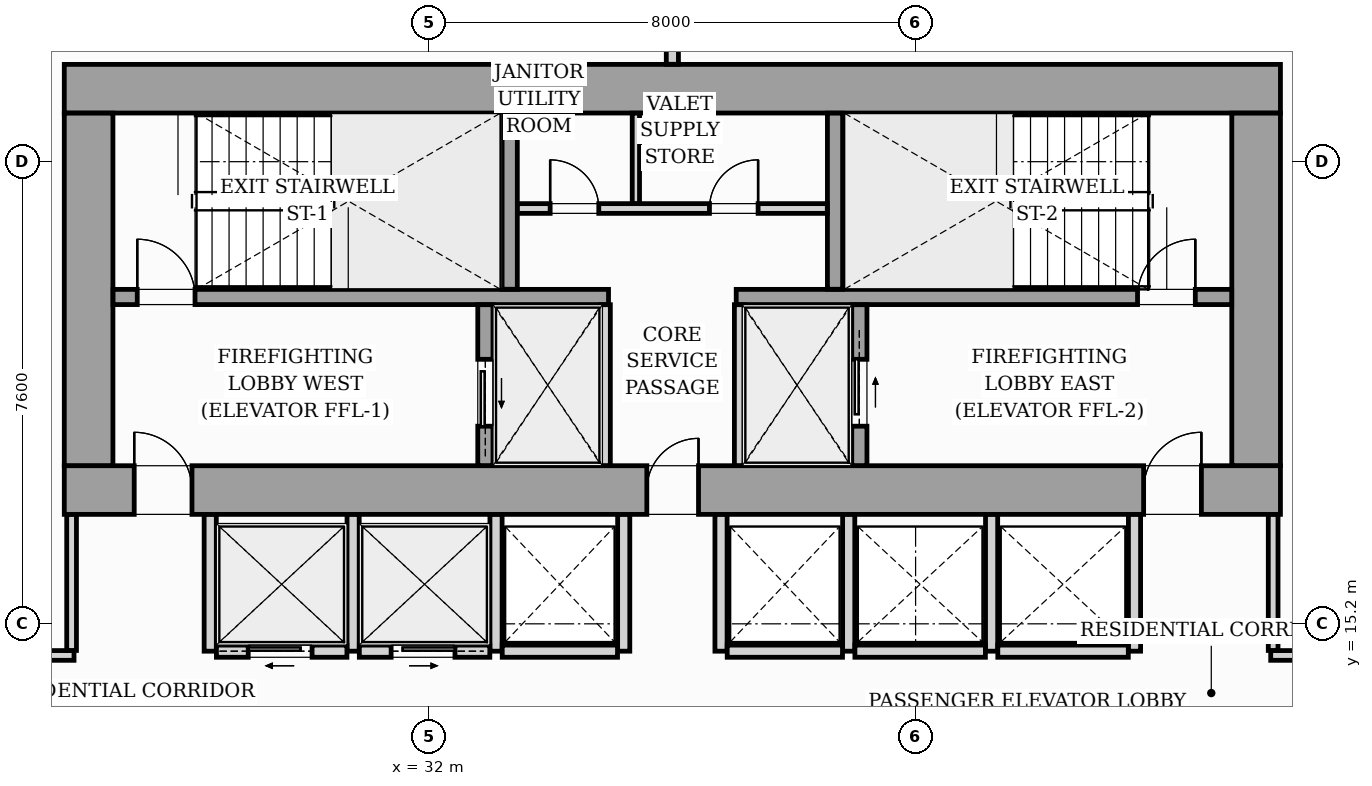
"""IFC4 building model, lengths in metres.
Left out: names, types, materials, properties, quantities, classifications, styles, units other than length and angle.
Written with IfcOpenShell. Run it as: python <this file> out.ifc"""

import sys

from ifc_helpers import new_model, si_unit, direction, frame, frame_2d, origin, origin_2d, place, context, subcontext, project, spatial, rectangle, i_section, extrude, source, transform, mapped, element, fill, save


model = new_model("IFC4")
c1 = context("Model", 3, precision=1e-05, world=origin(), true_north=direction((0.0, 1.0)))
c2 = subcontext(c1, "Body", "Model", "MODEL_VIEW")
j1 = project(units=[si_unit("LENGTHUNIT", "METRE"), si_unit("PLANEANGLEUNIT", "RADIAN")], contexts=[c1])
p1 = place(None, origin())
s1 = spatial("IfcSite", under=j1, at=p1, CompositionType="ELEMENT")
p2 = place(p1, origin())
s2 = spatial("IfcBuilding", under=s1, at=p2, CompositionType="ELEMENT")
p3 = place(p2, frame((0.0, 0.0, 58.2)))
s3 = spatial("IfcBuildingStorey", under=s2, at=p3, CompositionType="ELEMENT", Elevation=58.2)
m1 = source(origin(), c2, "Body", "SweptSolid", [
    extrude(i_section(OverallWidth=0.437, OverallDepth=0.514, WebThickness=0.061, FlangeThickness=0.097, FilletRadius=0.018, at=origin_2d()), origin(), (0.0, 0.0, 1.0), 3.196),
])
for number, where, z_axis, x_axis in (
    (1, (26.4, 17.4, 0.002), (0.0, 0.0, 1.0), (1.0, 0.0, 0.0)),
    (2, (33.12, 17.4, 0.002), (0.0, 0.0, 1.0), (1.0, 0.0, 0.0)),
    (3, (38.88, 17.4, 0.002), (0.0, 0.0, 1.0), (1.0, 0.0, 0.0)),
    (4, (45.6, 17.4, 0.002), (0.0, 0.0, 1.0), (1.0, 0.0, 0.0)),
    (5, (26.4, 24.0, 0.002), (0.0, 0.0, 1.0), (1.0, 0.0, 0.0)),
    (6, (33.12, 24.0, 0.002), (0.0, 0.0, 1.0), (1.0, 0.0, 0.0)),
    (7, (38.88, 24.0, 0.002), (0.0, 0.0, 1.0), (1.0, 0.0, 0.0)),
    (8, (45.6, 24.0, 0.002), (0.0, 0.0, 1.0), (1.0, 0.0, 0.0)),
):
    element("IfcColumn", number, at=place(p3, frame(where, z_axis=z_axis, x_axis=x_axis)), inside=s3, PredefinedType="PILASTER", context=c2, shape_type="MappedRepresentation", body=[
        mapped(m1, transform((0.0, 0.0, 0.0), scale=1.0)),
    ])
p4 = place(p3, frame((26.0, 17.4, 0.0), z_axis=(0.0, 0.0, 1.0), x_axis=(1.0, 0.0, 0.0)))
e9 = element("IfcWall", 9, at=p4, inside=s3, PredefinedType="SHEAR", context=c2, shape_type="SweptSolid", body=[
    extrude(rectangle(XDim=20.0, YDim=0.8, at=frame_2d((10.0, 0.0))), origin(), (0.0, 0.0, 1.0), 3.2),
])
p5 = place(p4, frame((1.15, 0.0, 0.0)))
e10 = element("IfcOpeningElement", 10, at=p5, cuts=e9, PredefinedType="OPENING", context=c2, shape_type="SweptSolid", body=[
    extrude(rectangle(XDim=0.95, YDim=2.06, at=frame_2d((0.475, 1.03))), frame((0.0, 0.41, 0.0), z_axis=(0.0, -1.0, 0.0), x_axis=(1.0, 0.0, 0.0)), (0.0, 0.0, 1.0), 0.82),
])
p6 = place(p4, frame((9.58, 0.0, 0.0)))
e11 = element("IfcOpeningElement", 11, at=p6, cuts=e9, PredefinedType="OPENING", context=c2, shape_type="SweptSolid", body=[
    extrude(rectangle(XDim=0.85, YDim=2.0, at=frame_2d((0.425, 1.0))), frame((0.0, 0.41, 0.0), z_axis=(0.0, -1.0, 0.0), x_axis=(1.0, 0.0, 0.0)), (0.0, 0.0, 1.0), 0.82),
])
p7 = place(p4, frame((17.75, 0.0, 0.0)))
e12 = element("IfcOpeningElement", 12, at=p7, cuts=e9, PredefinedType="OPENING", context=c2, shape_type="SweptSolid", body=[
    extrude(rectangle(XDim=0.95, YDim=2.06, at=frame_2d((0.475, 1.03))), frame((0.0, 0.41, 0.0), z_axis=(0.0, -1.0, 0.0), x_axis=(1.0, 0.0, 0.0)), (0.0, 0.0, 1.0), 0.82),
])
p8 = place(p3, frame((26.0, 24.0, 0.0), z_axis=(0.0, 0.0, 1.0), x_axis=(1.0, 0.0, 0.0)))
e13 = element("IfcWall", 13, at=p8, inside=s3, PredefinedType="SHEAR", context=c2, shape_type="SweptSolid", body=[
    extrude(rectangle(XDim=20.0, YDim=0.8, at=frame_2d((10.0, 0.0))), origin(), (0.0, 0.0, 1.0), 3.2),
])
for number, where, z_axis, x_axis in (
    (14, (26.4, 17.802, 0.0), (0.0, 0.0, 1.0), (0.0, 1.0, 0.0)),
    (15, (45.6, 17.802, 0.0), (0.0, 0.0, 1.0), (0.0, 1.0, 0.0)),
):
    element("IfcWall", number, at=place(p3, frame(where, z_axis=z_axis, x_axis=x_axis)), inside=s3, PredefinedType="SHEAR", context=c2, shape_type="SweptSolid", body=[
        extrude(rectangle(XDim=5.796, YDim=0.8, at=frame_2d((2.898, 0.0))), origin(), (0.0, 0.0, 1.0), 3.2),
    ])
p9 = place(p3, frame((26.802, 20.575, 0.0), z_axis=(0.0, 0.0, 1.0), x_axis=(1.0, 0.0, 0.0)))
e16 = element("IfcWall", 16, at=p9, inside=s3, PredefinedType="SOLIDWALL", context=c2, shape_type="SweptSolid", body=[
    extrude(rectangle(XDim=8.148, YDim=0.25, at=frame_2d((4.074, 0.0))), origin(), (0.0, 0.0, 1.0), 3.2),
])
p10 = place(p9, frame((0.398, 0.0, 0.0)))
e17 = element("IfcOpeningElement", 17, at=p10, cuts=e16, PredefinedType="OPENING", context=c2, shape_type="SweptSolid", body=[
    extrude(rectangle(XDim=0.95, YDim=2.06, at=frame_2d((0.475, 1.03))), frame((0.0, 0.135, 0.0), z_axis=(0.0, -1.0, 0.0), x_axis=(1.0, 0.0, 0.0)), (0.0, 0.0, 1.0), 0.27),
])
p11 = place(p3, frame((37.05, 20.575, 0.0), z_axis=(0.0, 0.0, 1.0), x_axis=(1.0, 0.0, 0.0)))
e18 = element("IfcWall", 18, at=p11, inside=s3, PredefinedType="SOLIDWALL", context=c2, shape_type="SweptSolid", body=[
    extrude(rectangle(XDim=8.148, YDim=0.25, at=frame_2d((4.074, 0.0))), origin(), (0.0, 0.0, 1.0), 3.2),
])
p12 = place(p11, frame((6.6, 0.0, 0.0)))
e19 = element("IfcOpeningElement", 19, at=p12, cuts=e18, PredefinedType="OPENING", context=c2, shape_type="SweptSolid", body=[
    extrude(rectangle(XDim=0.95, YDim=2.06, at=frame_2d((0.475, 1.03))), frame((0.0, 0.135, 0.0), z_axis=(0.0, -1.0, 0.0), x_axis=(1.0, 0.0, 0.0)), (0.0, 0.0, 1.0), 0.27),
])
for number, where, z_axis, x_axis in (
    (20, (33.325, 20.702, 0.0), (0.0, 0.0, 1.0), (0.0, 1.0, 0.0)),
    (21, (38.675, 20.702, 0.0), (0.0, 0.0, 1.0), (0.0, 1.0, 0.0)),
):
    element("IfcWall", number, at=place(p3, frame(where, z_axis=z_axis, x_axis=x_axis)), inside=s3, PredefinedType="SOLIDWALL", context=c2, shape_type="SweptSolid", body=[
        extrude(rectangle(XDim=2.896, YDim=0.25, at=frame_2d((1.448, 0.0))), origin(), (0.0, 0.0, 1.0), 3.2),
    ])
p13 = place(p3, frame((32.925, 17.802, 0.0), z_axis=(0.0, 0.0, 1.0), x_axis=(0.0, 1.0, 0.0)))
e22 = element("IfcWall", 22, at=p13, inside=s3, PredefinedType="SOLIDWALL", context=c2, shape_type="SweptSolid", body=[
    extrude(rectangle(XDim=2.646, YDim=0.25, at=frame_2d((1.323, 0.0))), origin(), (0.0, 0.0, 1.0), 3.2),
])
p14 = place(p13, frame((0.648, 0.0, 0.0)))
e23 = element("IfcOpeningElement", 23, at=p14, cuts=e22, PredefinedType="OPENING", context=c2, shape_type="SweptSolid", body=[
    extrude(rectangle(XDim=1.1, YDim=2.08, at=frame_2d((0.55, 1.04))), frame((0.0, 0.135, 0.0), z_axis=(0.0, -1.0, 0.0), x_axis=(1.0, 0.0, 0.0)), (0.0, 0.0, 1.0), 0.27),
])
for number, where, z_axis, x_axis in (
    (24, (34.9, 17.802, 0.0), (0.0, 0.0, 1.0), (0.0, 1.0, 0.0)),
    (25, (37.1, 17.802, 0.0), (0.0, 0.0, 1.0), (0.0, 1.0, 0.0)),
):
    element("IfcWall", number, at=place(p3, frame(where, z_axis=z_axis, x_axis=x_axis)), inside=s3, PredefinedType="PARTITIONING", context=c2, shape_type="SweptSolid", body=[
        extrude(rectangle(XDim=2.646, YDim=0.16, at=frame_2d((1.323, 0.0))), origin(), (0.0, 0.0, 1.0), 2.94),
    ])
p15 = place(p3, frame((39.075, 17.802, 0.0), z_axis=(0.0, 0.0, 1.0), x_axis=(0.0, 1.0, 0.0)))
e26 = element("IfcWall", 26, at=p15, inside=s3, PredefinedType="SOLIDWALL", context=c2, shape_type="SweptSolid", body=[
    extrude(rectangle(XDim=2.646, YDim=0.25, at=frame_2d((1.323, 0.0))), origin(), (0.0, 0.0, 1.0), 3.2),
])
p16 = place(p15, frame((0.648, 0.0, 0.0)))
e27 = element("IfcOpeningElement", 27, at=p16, cuts=e26, PredefinedType="OPENING", context=c2, shape_type="SweptSolid", body=[
    extrude(rectangle(XDim=1.1, YDim=2.08, at=frame_2d((0.55, 1.04))), frame((0.0, 0.135, 0.0), z_axis=(0.0, -1.0, 0.0), x_axis=(1.0, 0.0, 0.0)), (0.0, 0.0, 1.0), 0.27),
])
p17 = place(p3, frame((33.452, 22.03, 0.0), z_axis=(0.0, 0.0, 1.0), x_axis=(1.0, 0.0, 0.0)))
e28 = element("IfcWall", 28, at=p17, inside=s3, PredefinedType="PARTITIONING", context=c2, shape_type="SweptSolid", body=[
    extrude(rectangle(XDim=5.096, YDim=0.16, at=frame_2d((2.548, 0.0))), origin(), (0.0, 0.0, 1.0), 2.94),
])
p18 = place(p17, frame((0.538, 0.0, 0.0)))
e29 = element("IfcOpeningElement", 29, at=p18, cuts=e28, PredefinedType="OPENING", context=c2, shape_type="SweptSolid", body=[
    extrude(rectangle(XDim=0.8, YDim=2.05, at=frame_2d((0.4, 1.025))), frame((0.0, 0.09, 0.0), z_axis=(0.0, -1.0, 0.0), x_axis=(1.0, 0.0, 0.0)), (0.0, 0.0, 1.0), 0.18),
])
p19 = place(p17, frame((3.158, 0.0, 0.0)))
e30 = element("IfcOpeningElement", 30, at=p19, cuts=e28, PredefinedType="OPENING", context=c2, shape_type="SweptSolid", body=[
    extrude(rectangle(XDim=0.8, YDim=2.05, at=frame_2d((0.4, 1.025))), frame((0.0, 0.09, 0.0), z_axis=(0.0, -1.0, 0.0), x_axis=(1.0, 0.0, 0.0)), (0.0, 0.0, 1.0), 0.18),
])
p20 = place(p3, frame((35.4, 22.112, 0.0), z_axis=(0.0, 0.0, 1.0), x_axis=(0.0, 1.0, 0.0)))
e31 = element("IfcWall", 31, at=p20, inside=s3, PredefinedType="PARTITIONING", context=c2, shape_type="SweptSolid", body=[
    extrude(rectangle(XDim=1.486, YDim=0.12, at=frame_2d((0.743, 0.0))), origin(), (0.0, 0.0, 1.0), 2.94),
])
for number, where, z_axis, x_axis in (
    (32, (28.4, 14.75, 0.0), (0.0, 0.0, 1.0), (0.0, 1.0, 0.0)),
    (33, (30.75, 14.75, 0.0), (0.0, 0.0, 1.0), (0.0, 1.0, 0.0)),
    (34, (33.1, 14.75, 0.0), (0.0, 0.0, 1.0), (0.0, 1.0, 0.0)),
):
    element("IfcWall", number, at=place(p3, frame(where, z_axis=z_axis, x_axis=x_axis)), inside=s3, PredefinedType="PARTITIONING", context=c2, shape_type="SweptSolid", body=[
        extrude(rectangle(XDim=2.248, YDim=0.2, at=frame_2d((1.124, 0.0))), origin(), (0.0, 0.0, 1.0), 2.94),
    ])
p21 = place(p3, frame((28.502, 14.75, 0.0), z_axis=(0.0, 0.0, 1.0), x_axis=(1.0, 0.0, 0.0)))
e35 = element("IfcWall", 35, at=p21, inside=s3, PredefinedType="PARTITIONING", context=c2, shape_type="SweptSolid", body=[
    extrude(rectangle(XDim=2.146, YDim=0.2, at=frame_2d((1.073, 0.0))), origin(), (0.0, 0.0, 1.0), 2.94),
])
p22 = place(p21, frame((0.523, 0.0, 0.0)))
e36 = element("IfcOpeningElement", 36, at=p22, cuts=e35, PredefinedType="OPENING", context=c2, shape_type="SweptSolid", body=[
    extrude(rectangle(XDim=1.05, YDim=2.08, at=frame_2d((0.525, 1.04))), frame((0.0, 0.11, 0.0), z_axis=(0.0, -1.0, 0.0), x_axis=(1.0, 0.0, 0.0)), (0.0, 0.0, 1.0), 0.22),
])
p23 = place(p3, frame((30.852, 14.75, 0.0), z_axis=(0.0, 0.0, 1.0), x_axis=(1.0, 0.0, 0.0)))
e37 = element("IfcWall", 37, at=p23, inside=s3, PredefinedType="PARTITIONING", context=c2, shape_type="SweptSolid", body=[
    extrude(rectangle(XDim=2.146, YDim=0.2, at=frame_2d((1.073, 0.0))), origin(), (0.0, 0.0, 1.0), 2.94),
])
p24 = place(p23, frame((0.523, 0.0, 0.0)))
e38 = element("IfcOpeningElement", 38, at=p24, cuts=e37, PredefinedType="OPENING", context=c2, shape_type="SweptSolid", body=[
    extrude(rectangle(XDim=1.05, YDim=2.08, at=frame_2d((0.525, 1.04))), frame((0.0, 0.11, 0.0), z_axis=(0.0, -1.0, 0.0), x_axis=(1.0, 0.0, 0.0)), (0.0, 0.0, 1.0), 0.22),
])
p25 = place(p3, frame((35.2, 14.75, 0.0), z_axis=(0.0, 0.0, 1.0), x_axis=(0.0, 1.0, 0.0)))
e39 = element("IfcWall", 39, at=p25, inside=s3, PredefinedType="PARTITIONING", context=c2, shape_type="SweptSolid", body=[
    extrude(rectangle(XDim=2.248, YDim=0.2, at=frame_2d((1.124, 0.0))), origin(), (0.0, 0.0, 1.0), 2.94),
])
p26 = place(p3, frame((33.202, 14.75, 0.0), z_axis=(0.0, 0.0, 1.0), x_axis=(1.0, 0.0, 0.0)))
e40 = element("IfcWall", 40, at=p26, inside=s3, PredefinedType="PARTITIONING", context=c2, shape_type="SweptSolid", body=[
    extrude(rectangle(XDim=1.896, YDim=0.2, at=frame_2d((0.948, 0.0))), origin(), (0.0, 0.0, 1.0), 2.94),
])
for number, where, z_axis, x_axis in (
    (41, (36.8, 14.75, 0.0), (0.0, 0.0, 1.0), (0.0, 1.0, 0.0)),
    (42, (38.9, 14.75, 0.0), (0.0, 0.0, 1.0), (0.0, 1.0, 0.0)),
):
    element("IfcWall", number, at=place(p3, frame(where, z_axis=z_axis, x_axis=x_axis)), inside=s3, PredefinedType="PARTITIONING", context=c2, shape_type="SweptSolid", body=[
        extrude(rectangle(XDim=2.248, YDim=0.2, at=frame_2d((1.124, 0.0))), origin(), (0.0, 0.0, 1.0), 2.94),
    ])
p27 = place(p3, frame((36.902, 14.75, 0.0), z_axis=(0.0, 0.0, 1.0), x_axis=(1.0, 0.0, 0.0)))
e43 = element("IfcWall", 43, at=p27, inside=s3, PredefinedType="PARTITIONING", context=c2, shape_type="SweptSolid", body=[
    extrude(rectangle(XDim=1.896, YDim=0.2, at=frame_2d((0.948, 0.0))), origin(), (0.0, 0.0, 1.0), 2.94),
])
for number, where, z_axis, x_axis in (
    (44, (41.25, 14.75, 0.0), (0.0, 0.0, 1.0), (0.0, 1.0, 0.0)),
    (45, (43.6, 14.75, 0.0), (0.0, 0.0, 1.0), (0.0, 1.0, 0.0)),
):
    element("IfcWall", number, at=place(p3, frame(where, z_axis=z_axis, x_axis=x_axis)), inside=s3, PredefinedType="PARTITIONING", context=c2, shape_type="SweptSolid", body=[
        extrude(rectangle(XDim=2.248, YDim=0.2, at=frame_2d((1.124, 0.0))), origin(), (0.0, 0.0, 1.0), 2.94),
    ])
for number, where, z_axis, x_axis in (
    (46, (39.002, 14.75, 0.0), (0.0, 0.0, 1.0), (1.0, 0.0, 0.0)),
    (47, (41.352, 14.75, 0.0), (0.0, 0.0, 1.0), (1.0, 0.0, 0.0)),
):
    element("IfcWall", number, at=place(p3, frame(where, z_axis=z_axis, x_axis=x_axis)), inside=s3, PredefinedType="PARTITIONING", context=c2, shape_type="SweptSolid", body=[
        extrude(rectangle(XDim=2.146, YDim=0.2, at=frame_2d((1.073, 0.0))), origin(), (0.0, 0.0, 1.0), 2.94),
    ])
p28 = place(p3, frame((36.0, 24.402, 0.0), z_axis=(0.0, 0.0, 1.0), x_axis=(0.0, 1.0, 0.0)))
e48 = element("IfcWall", 48, at=p28, inside=s3, PredefinedType="PARTITIONING", context=c2, shape_type="SweptSolid", body=[
    extrude(rectangle(XDim=3.218, YDim=0.2, at=frame_2d((1.609, 0.0))), origin(), (0.0, 0.0, 1.0), 2.94),
])
p29 = place(p3, frame((16.382, 14.68, 0.0), z_axis=(0.0, 0.0, 1.0), x_axis=(1.0, 0.0, 0.0)))
e49 = element("IfcWall", 49, at=p29, inside=s3, PredefinedType="PARTITIONING", context=c2, shape_type="SweptSolid", body=[
    extrude(rectangle(XDim=9.778, YDim=0.16, at=frame_2d((4.889, 0.0))), origin(), (0.0, 0.0, 1.0), 2.94),
])
p30 = place(p29, frame((4.313, 0.0, 0.0)))
e50 = element("IfcOpeningElement", 50, at=p30, cuts=e49, PredefinedType="OPENING", context=c2, shape_type="SweptSolid", body=[
    extrude(rectangle(XDim=0.95, YDim=2.06, at=frame_2d((0.475, 1.03))), frame((0.0, 0.09, 0.0), z_axis=(0.0, -1.0, 0.0), x_axis=(1.0, 0.0, 0.0)), (0.0, 0.0, 1.0), 0.18),
])
p31 = place(p3, frame((26.12, 14.762, 0.0), z_axis=(0.0, 0.0, 1.0), x_axis=(0.0, 1.0, 0.0)))
e51 = element("IfcWall", 51, at=p31, inside=s3, PredefinedType="PARTITIONING", context=c2, shape_type="SweptSolid", body=[
    extrude(rectangle(XDim=2.236, YDim=0.16, at=frame_2d((1.118, 0.0))), origin(), (0.0, 0.0, 1.0), 2.94),
])
p32 = place(p3, frame((45.84, 14.68, 0.0), z_axis=(0.0, 0.0, 1.0), x_axis=(1.0, 0.0, 0.0)))
e52 = element("IfcWall", 52, at=p32, inside=s3, PredefinedType="PARTITIONING", context=c2, shape_type="SweptSolid", body=[
    extrude(rectangle(XDim=5.578, YDim=0.16, at=frame_2d((2.789, 0.0))), origin(), (0.0, 0.0, 1.0), 2.94),
])
p33 = place(p32, frame((2.415, 0.0, 0.0)))
e53 = element("IfcOpeningElement", 53, at=p33, cuts=e52, PredefinedType="OPENING", context=c2, shape_type="SweptSolid", body=[
    extrude(rectangle(XDim=0.95, YDim=2.06, at=frame_2d((0.475, 1.03))), frame((0.0, 0.09, 0.0), z_axis=(0.0, -1.0, 0.0), x_axis=(1.0, 0.0, 0.0)), (0.0, 0.0, 1.0), 0.18),
])
p34 = place(p3, frame((45.88, 14.762, 0.0), z_axis=(0.0, 0.0, 1.0), x_axis=(0.0, 1.0, 0.0)))
e54 = element("IfcWall", 54, at=p34, inside=s3, PredefinedType="PARTITIONING", context=c2, shape_type="SweptSolid", body=[
    extrude(rectangle(XDim=2.236, YDim=0.16, at=frame_2d((1.118, 0.0))), origin(), (0.0, 0.0, 1.0), 2.94),
])
m2 = source(origin(), c2, "Body", "SweptSolid", [
    extrude(rectangle(XDim=0.95, YDim=2.06, at=frame_2d((0.475, 1.03))), frame((0.0, 0.025, 0.0), z_axis=(0.0, -1.0, 0.0), x_axis=(1.0, 0.0, 0.0)), (0.0, 0.0, 1.0), 0.05),
])
p35 = place(p5, origin())
e55 = element("IfcDoor", 55, at=p35, inside=s3, OperationType="SINGLE_SWING_LEFT", PredefinedType="DOOR", context=c2, shape_type="MappedRepresentation", body=[
    mapped(m2, transform((0.0, 0.0, 0.0), scale=1.0)),
])
fill(e10, e55)
m3 = source(origin(), c2, "Body", "SweptSolid", [
    extrude(rectangle(XDim=0.85, YDim=2.0, at=frame_2d((0.425, 1.0))), frame((0.0, 0.025, 0.0), z_axis=(0.0, -1.0, 0.0), x_axis=(1.0, 0.0, 0.0)), (0.0, 0.0, 1.0), 0.05),
])
p36 = place(p6, origin())
e56 = element("IfcDoor", 56, at=p36, inside=s3, OperationType="SINGLE_SWING_RIGHT", PredefinedType="DOOR", context=c2, shape_type="MappedRepresentation", body=[
    mapped(m3, transform((0.0, 0.0, 0.0), scale=1.0)),
])
fill(e11, e56)
p37 = place(p7, origin())
e57 = element("IfcDoor", 57, at=p37, inside=s3, OperationType="SINGLE_SWING_RIGHT", PredefinedType="DOOR", context=c2, shape_type="MappedRepresentation", body=[
    mapped(m2, transform((0.0, 0.0, 0.0), scale=1.0)),
])
fill(e12, e57)
p38 = place(p10, origin())
e58 = element("IfcDoor", 58, at=p38, inside=s3, OperationType="SINGLE_SWING_LEFT", PredefinedType="DOOR", context=c2, shape_type="MappedRepresentation", body=[
    mapped(m2, transform((0.0, 0.0, 0.0), scale=1.0)),
])
fill(e17, e58)
p39 = place(p12, origin())
e59 = element("IfcDoor", 59, at=p39, inside=s3, OperationType="SINGLE_SWING_RIGHT", PredefinedType="DOOR", context=c2, shape_type="MappedRepresentation", body=[
    mapped(m2, transform((0.0, 0.0, 0.0), scale=1.0)),
])
fill(e19, e59)
m4 = source(origin(), c2, "Body", "SweptSolid", [
    extrude(rectangle(XDim=1.1, YDim=2.08, at=frame_2d((0.55, 1.04))), frame((0.0, 0.025, 0.0), z_axis=(0.0, -1.0, 0.0), x_axis=(1.0, 0.0, 0.0)), (0.0, 0.0, 1.0), 0.05),
])
p40 = place(p14, origin())
e60 = element("IfcDoor", 60, at=p40, inside=s3, OperationType="SLIDING_TO_LEFT", PredefinedType="DOOR", context=c2, shape_type="MappedRepresentation", body=[
    mapped(m4, transform((0.0, 0.0, 0.0), scale=1.0)),
])
fill(e23, e60)
p41 = place(p16, origin())
e61 = element("IfcDoor", 61, at=p41, inside=s3, OperationType="SLIDING_TO_RIGHT", PredefinedType="DOOR", context=c2, shape_type="MappedRepresentation", body=[
    mapped(m4, transform((0.0, 0.0, 0.0), scale=1.0)),
])
fill(e27, e61)
m5 = source(origin(), c2, "Body", "SweptSolid", [
    extrude(rectangle(XDim=0.8, YDim=2.05, at=frame_2d((0.4, 1.025))), frame((0.0, 0.025, 0.0), z_axis=(0.0, -1.0, 0.0), x_axis=(1.0, 0.0, 0.0)), (0.0, 0.0, 1.0), 0.05),
])
p42 = place(p18, origin())
e62 = element("IfcDoor", 62, at=p42, inside=s3, OperationType="SINGLE_SWING_LEFT", PredefinedType="DOOR", context=c2, shape_type="MappedRepresentation", body=[
    mapped(m5, transform((0.0, 0.0, 0.0), scale=1.0)),
])
fill(e29, e62)
p43 = place(p19, origin())
e63 = element("IfcDoor", 63, at=p43, inside=s3, OperationType="SINGLE_SWING_RIGHT", PredefinedType="DOOR", context=c2, shape_type="MappedRepresentation", body=[
    mapped(m5, transform((0.0, 0.0, 0.0), scale=1.0)),
])
fill(e30, e63)
m6 = source(origin(), c2, "Body", "SweptSolid", [
    extrude(rectangle(XDim=1.05, YDim=2.08, at=frame_2d((0.525, 1.04))), frame((0.0, 0.025, 0.0), z_axis=(0.0, -1.0, 0.0), x_axis=(1.0, 0.0, 0.0)), (0.0, 0.0, 1.0), 0.05),
])
p44 = place(p22, origin())
e64 = element("IfcDoor", 64, at=p44, inside=s3, OperationType="SLIDING_TO_LEFT", PredefinedType="DOOR", context=c2, shape_type="MappedRepresentation", body=[
    mapped(m6, transform((0.0, 0.0, 0.0), scale=1.0)),
])
fill(e36, e64)
p45 = place(p24, origin())
e65 = element("IfcDoor", 65, at=p45, inside=s3, OperationType="SLIDING_TO_RIGHT", PredefinedType="DOOR", context=c2, shape_type="MappedRepresentation", body=[
    mapped(m6, transform((0.0, 0.0, 0.0), scale=1.0)),
])
fill(e38, e65)
save(model, sys.argv[1])
